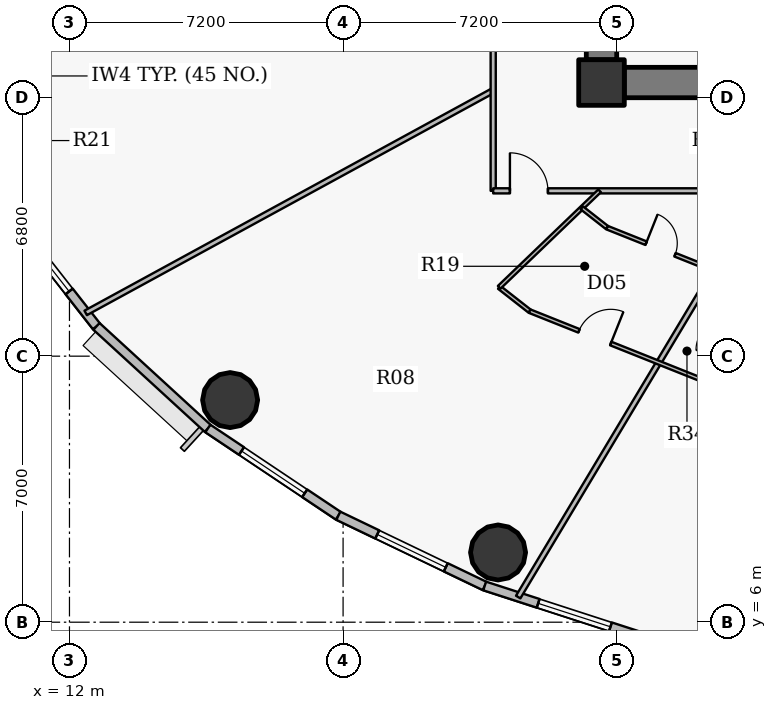
"""IFC4 building model, lengths in metres.
Left out: names, types, materials, properties, quantities, classifications, styles, units other than length and angle.
Written with IfcOpenShell. Run it as: python <this file> out.ifc"""

import sys

from ifc_helpers import new_model, si_unit, direction, frame, frame_2d, origin, origin_2d, place, context, subcontext, project, spatial, rectangle, hollow_circle, extrude, source, transform, mapped, element, fill, save


model = new_model("IFC4")
c1 = context("Model", 3, precision=1e-05, world=origin(), true_north=direction((0.0, 1.0)))
c2 = subcontext(c1, "Body", "Model", "MODEL_VIEW")
j1 = project(units=[si_unit("LENGTHUNIT", "METRE"), si_unit("PLANEANGLEUNIT", "RADIAN")], contexts=[c1])
p1 = place(None, origin())
s1 = spatial("IfcSite", under=j1, at=p1, CompositionType="ELEMENT")
p2 = place(p1, origin())
s2 = spatial("IfcBuilding", under=s1, at=p2, CompositionType="ELEMENT")
p3 = place(p2, frame((0.0, 0.0, 104.7)))
s3 = spatial("IfcBuildingStorey", under=s2, at=p3, CompositionType="ELEMENT", Elevation=104.7)
p4 = place(p3, frame((26.0, 20.2, 0.0), z_axis=(0.0, 0.0, 1.0), x_axis=(1.0, 0.0, 0.0)))
e1 = element("IfcColumn", 1, at=p4, inside=s3, PredefinedType="COLUMN", context=c2, shape_type="SweptSolid", body=[
    extrude(rectangle(XDim=1.2, YDim=1.2, at=origin_2d()), origin(), (0.0, 0.0, 1.0), 3.75),
])
p5 = place(p3, frame((45.4, 20.2, 0.0), z_axis=(0.0, 0.0, 1.0), x_axis=(-1.0, 0.0, 0.0)))
e2 = element("IfcWall", 2, at=p5, inside=s3, PredefinedType="SHEAR", context=c2, shape_type="SweptSolid", body=[
    extrude(rectangle(XDim=18.8, YDim=0.8, at=frame_2d((9.4, 0.0))), origin(), (0.0, 0.0, 1.0), 2.95),
])
p6 = place(p5, frame((10.15, 0.0, 0.0)))
e3 = element("IfcOpeningElement", 3, at=p6, cuts=e2, PredefinedType="OPENING", context=c2, shape_type="SweptSolid", body=[
    extrude(rectangle(XDim=1.15, YDim=2.15, at=origin_2d()), frame((0.575, 0.41, 1.075), z_axis=(0.0, -1.0, 0.0), x_axis=(1.0, 0.0, 0.0)), (0.0, 0.0, 1.0), 0.82),
])
p7 = place(p3, frame((26.0, 20.8, 0.0), z_axis=(0.0, 0.0, 1.0), x_axis=(0.0, 1.0, 0.0)))
e4 = element("IfcWall", 4, at=p7, inside=s3, PredefinedType="SHEAR", context=c2, shape_type="SweptSolid", body=[
    extrude(rectangle(XDim=12.4, YDim=0.8, at=frame_2d((6.2, 0.0))), origin(), (0.0, 0.0, 1.0), 2.95),
])
p8 = place(p7, frame((5.79, 0.0, 0.0)))
e5 = element("IfcOpeningElement", 5, at=p8, cuts=e4, PredefinedType="OPENING", context=c2, shape_type="SweptSolid", body=[
    extrude(rectangle(XDim=0.82, YDim=2.1, at=origin_2d()), frame((0.41, 0.41, 1.05), z_axis=(0.0, -1.0, 0.0), x_axis=(1.0, 0.0, 0.0)), (0.0, 0.0, 1.0), 0.82),
])
for number, where, z_axis, x_axis in (
    (6, (16.227, 11.844, 0.0), (0.0, 0.0, 1.0), (1.0, 0.0, 0.0)),
    (7, (23.278, 7.835, 0.0), (0.0, 0.0, 1.0), (1.0, 0.0, 0.0)),
):
    element("IfcColumn", number, at=place(p3, frame(where, z_axis=z_axis, x_axis=x_axis)), inside=s3, PredefinedType="COLUMN", context=c2, shape_type="SweptSolid", body=[
        extrude(hollow_circle(Radius=0.725, WallThickness=0.042, at=origin_2d()), origin(), (0.0, 0.0, 1.0), 3.75),
    ])
p9 = place(p3, frame((12.711, 13.783, 0.0), z_axis=(0.0, 0.0, 1.0), x_axis=(-0.616272103517, 0.787533297345, 0.0)))
e8 = element("IfcWall", 8, at=p9, inside=s3, PredefinedType="SOLIDWALL", context=c2, shape_type="SweptSolid", body=[
    extrude(rectangle(XDim=3.823, YDim=0.24, at=frame_2d((1.912, 0.0))), origin(), (0.0, 0.0, 1.0), 3.5),
])
p10 = place(p9, frame((1.168, 0.0, 0.9)))
e9 = element("IfcOpeningElement", 9, at=p10, cuts=e8, PredefinedType="OPENING", context=c2, shape_type="SweptSolid", body=[
    extrude(rectangle(XDim=1.25, YDim=1.65, at=origin_2d()), frame((0.625, 0.13, 0.825), z_axis=(0.0, -1.0, 0.0), x_axis=(1.0, 0.0, 0.0)), (0.0, 0.0, 1.0), 0.26),
])
p11 = place(p3, frame((15.642, 11.097, 0.0), z_axis=(0.0, 0.0, 1.0), x_axis=(-0.737113356241, 0.675769117414, 0.0)))
e10 = element("IfcWall", 10, at=p11, inside=s3, PredefinedType="SOLIDWALL", context=c2, shape_type="SweptSolid", body=[
    extrude(rectangle(XDim=3.976, YDim=0.24, at=frame_2d((1.988, 0.0))), origin(), (0.0, 0.0, 1.0), 3.5),
])
p12 = place(p3, frame((19.075, 8.801, 0.0), z_axis=(0.0, 0.0, 1.0), x_axis=(-0.831221811447, 0.555940914284, 0.0)))
e11 = element("IfcWall", 11, at=p12, inside=s3, PredefinedType="SOLIDWALL", context=c2, shape_type="SweptSolid", body=[
    extrude(rectangle(XDim=4.13, YDim=0.24, at=frame_2d((2.065, 0.0))), origin(), (0.0, 0.0, 1.0), 3.5),
])
p13 = place(p12, frame((1.065, 0.0, 0.9)))
e12 = element("IfcOpeningElement", 12, at=p13, cuts=e11, PredefinedType="OPENING", context=c2, shape_type="SweptSolid", body=[
    extrude(rectangle(XDim=2.0, YDim=1.75, at=origin_2d()), frame((1.0, 0.13, 0.875), z_axis=(0.0, -1.0, 0.0), x_axis=(1.0, 0.0, 0.0)), (0.0, 0.0, 1.0), 0.26),
])
p14 = place(p3, frame((22.926, 6.953, 0.0), z_axis=(0.0, 0.0, 1.0), x_axis=(-0.901589935876, 0.432591709962, 0.0)))
e13 = element("IfcWall", 13, at=p14, inside=s3, PredefinedType="SOLIDWALL", context=c2, shape_type="SweptSolid", body=[
    extrude(rectangle(XDim=4.272, YDim=0.24, at=frame_2d((2.136, 0.0))), origin(), (0.0, 0.0, 1.0), 3.5),
])
p15 = place(p14, frame((1.136, 0.0, 0.9)))
e14 = element("IfcOpeningElement", 14, at=p15, cuts=e13, PredefinedType="OPENING", context=c2, shape_type="SweptSolid", body=[
    extrude(rectangle(XDim=2.0, YDim=1.75, at=origin_2d()), frame((1.0, 0.13, 0.875), z_axis=(0.0, -1.0, 0.0), x_axis=(1.0, 0.0, 0.0)), (0.0, 0.0, 1.0), 0.26),
])
p16 = place(p3, frame((27.1, 5.599, 0.0), z_axis=(0.0, 0.0, 1.0), x_axis=(-0.951211346073, 0.308540070495, 0.0)))
e15 = element("IfcWall", 15, at=p16, inside=s3, PredefinedType="SOLIDWALL", context=c2, shape_type="SweptSolid", body=[
    extrude(rectangle(XDim=4.388, YDim=0.24, at=frame_2d((2.194, 0.0))), origin(), (0.0, 0.0, 1.0), 3.5),
])
p17 = place(p16, frame((0.909, 0.0, 0.9)))
e16 = element("IfcOpeningElement", 16, at=p17, cuts=e15, PredefinedType="OPENING", context=c2, shape_type="SweptSolid", body=[
    extrude(rectangle(XDim=2.0, YDim=1.75, at=origin_2d()), frame((1.0, 0.13, 0.875), z_axis=(0.0, -1.0, 0.0), x_axis=(1.0, 0.0, 0.0)), (0.0, 0.0, 1.0), 0.26),
])
p18 = place(p3, frame((12.427, 14.138, 0.0), z_axis=(0.0, 0.0, 1.0), x_axis=(0.877835987922, 0.47896135367, 0.0)))
e17 = element("IfcWall", 17, at=p18, inside=s3, PredefinedType="PARTITIONING", context=c2, shape_type="SweptSolid", body=[
    extrude(rectangle(XDim=12.215, YDim=0.135, at=frame_2d((6.107, 0.0))), origin(), (0.0, 0.0, 1.0), 2.935),
])
p19 = place(p3, frame((23.15, 17.35, 0.0), z_axis=(0.0, 0.0, 1.0), x_axis=(0.0, 1.0, 0.0)))
e18 = element("IfcWall", 18, at=p19, inside=s3, PredefinedType="PARTITIONING", context=c2, shape_type="SweptSolid", body=[
    extrude(rectangle(XDim=19.3, YDim=0.135, at=frame_2d((9.65, 0.0))), origin(), (0.0, 0.0, 1.0), 2.935),
])
p20 = place(p19, frame((7.86, 0.0, 0.0)))
e19 = element("IfcOpeningElement", 19, at=p20, cuts=e18, PredefinedType="OPENING", context=c2, shape_type="SweptSolid", body=[
    extrude(rectangle(XDim=1.0, YDim=2.15, at=origin_2d()), frame((0.5, 0.078, 1.075), z_axis=(0.0, -1.0, 0.0), x_axis=(1.0, 0.0, 0.0)), (0.0, 0.0, 1.0), 0.155),
])
p21 = place(p3, frame((23.15, 17.35, 0.0), z_axis=(0.0, 0.0, 1.0), x_axis=(1.0, 0.0, 0.0)))
e20 = element("IfcWall", 20, at=p21, inside=s3, PredefinedType="PARTITIONING", context=c2, shape_type="SweptSolid", body=[
    extrude(rectangle(XDim=10.373, YDim=0.135, at=frame_2d((5.187, 0.0))), origin(), (0.0, 0.0, 1.0), 2.935),
])
p22 = place(p21, frame((0.44, 0.0, 0.0)))
e21 = element("IfcOpeningElement", 21, at=p22, cuts=e20, PredefinedType="OPENING", context=c2, shape_type="SweptSolid", body=[
    extrude(rectangle(XDim=1.0, YDim=2.15, at=origin_2d()), frame((0.5, 0.078, 1.075), z_axis=(0.0, -1.0, 0.0), x_axis=(1.0, 0.0, 0.0)), (0.0, 0.0, 1.0), 0.155),
])
p23 = place(p3, frame((23.307, 14.812, 0.0), z_axis=(0.0, 0.0, 1.0), x_axis=(0.787398737985, -0.616444018075, 0.0)))
e22 = element("IfcWall", 22, at=p23, inside=s3, PredefinedType="PARTITIONING", context=c2, shape_type="SweptSolid", body=[
    extrude(rectangle(XDim=1.018, YDim=0.1, at=frame_2d((0.509, 0.0))), origin(), (0.0, 0.0, 1.0), 3.085),
])
p24 = place(p3, frame((23.307, 14.812, 0.0), z_axis=(0.0, 0.0, 1.0), x_axis=(0.721286127108, 0.692637223113, 0.0)))
e23 = element("IfcWall", 23, at=p24, inside=s3, PredefinedType="PARTITIONING", context=c2, shape_type="SweptSolid", body=[
    extrude(rectangle(XDim=3.664, YDim=0.1, at=frame_2d((1.832, 0.0))), origin(), (0.0, 0.0, 1.0), 3.5),
])
p25 = place(p3, frame((23.808, 6.661, 0.0), z_axis=(0.0, 0.0, 1.0), x_axis=(0.51416439954, 0.857691652195, 0.0)))
e24 = element("IfcWall", 24, at=p25, inside=s3, PredefinedType="PARTITIONING", context=c2, shape_type="SweptSolid", body=[
    extrude(rectangle(XDim=12.462, YDim=0.135, at=frame_2d((6.231, 0.0))), origin(), (0.0, 0.0, 1.0), 2.935),
])
p26 = place(p3, frame((24.109, 14.184, 0.0), z_axis=(0.0, 0.0, 1.0), x_axis=(0.9288090756, -0.370558633798, 0.0)))
e25 = element("IfcWall", 25, at=p26, inside=s3, PredefinedType="PARTITIONING", context=c2, shape_type="SweptSolid", body=[
    extrude(rectangle(XDim=6.072, YDim=0.1, at=frame_2d((3.036, 0.0))), origin(), (0.0, 0.0, 1.0), 2.935),
])
p27 = place(p26, frame((1.398, 0.0, 0.0)))
e26 = element("IfcOpeningElement", 26, at=p27, cuts=e25, PredefinedType="OPENING", context=c2, shape_type="SweptSolid", body=[
    extrude(rectangle(XDim=0.9, YDim=2.1, at=origin_2d()), frame((0.45, 0.06, 1.05), z_axis=(0.0, -1.0, 0.0), x_axis=(1.0, 0.0, 0.0)), (0.0, 0.0, 1.0), 0.12),
])
p28 = place(p3, frame((25.483, 16.901, 0.0), z_axis=(0.0, 0.0, 1.0), x_axis=(0.787321722918, -0.616542378609, 0.0)))
e27 = element("IfcWall", 27, at=p28, inside=s3, PredefinedType="PARTITIONING", context=c2, shape_type="SweptSolid", body=[
    extrude(rectangle(XDim=0.844, YDim=0.1, at=frame_2d((0.422, 0.0))), origin(), (0.0, 0.0, 1.0), 3.5),
])
p29 = place(p3, frame((26.147, 16.381, 0.0), z_axis=(0.0, 0.0, 1.0), x_axis=(0.928793125476, -0.370598610451, 0.0)))
e28 = element("IfcWall", 28, at=p29, inside=s3, PredefinedType="PARTITIONING", context=c2, shape_type="SweptSolid", body=[
    extrude(rectangle(XDim=3.03, YDim=0.1, at=frame_2d((1.515, 0.0))), origin(), (0.0, 0.0, 1.0), 2.935),
])
p30 = place(p29, frame((1.105, 0.0, 0.0)))
e29 = element("IfcOpeningElement", 29, at=p30, cuts=e28, PredefinedType="OPENING", context=c2, shape_type="SweptSolid", body=[
    extrude(rectangle(XDim=0.82, YDim=2.1, at=origin_2d()), frame((0.41, 0.06, 1.05), z_axis=(0.0, -1.0, 0.0), x_axis=(1.0, 0.0, 0.0)), (0.0, 0.0, 1.0), 0.12),
])
p31 = place(p3, frame((25.6, 20.79, 0.0), z_axis=(0.0, 0.0, 1.0), x_axis=(0.0, -1.0, 0.0)))
e30 = element("IfcWall", 30, at=p31, inside=s3, PredefinedType="PARTITIONING", context=c2, shape_type="SweptSolid", body=[
    extrude(rectangle(XDim=0.99, YDim=0.135, at=frame_2d((0.495, 0.0))), origin(), (0.0, 0.0, 1.0), 3.5),
])
p32 = place(p3, frame((25.907, 19.8, 0.0), z_axis=(0.0, 0.0, 1.0), x_axis=(1.0, 0.0, 0.0)))
e31 = element("IfcWall", 31, at=p32, inside=s3, PredefinedType="PARTITIONING", context=c2, shape_type="SweptSolid", body=[
    extrude(rectangle(XDim=0.683, YDim=0.135, at=frame_2d((0.341, 0.0))), origin(), (0.0, 0.0, 1.0), 2.935),
])
m1 = source(origin(), c2, "Body", "SweptSolid", [
    extrude(rectangle(XDim=1.25, YDim=1.65, at=origin_2d()), frame((0.625, 0.03, 0.825), z_axis=(0.0, -1.0, 0.0), x_axis=(1.0, 0.0, 0.0)), (0.0, 0.0, 1.0), 0.06),
])
p33 = place(p10, origin())
e32 = element("IfcWindow", 32, at=p33, inside=s3, PartitioningType="SINGLE_PANEL", PredefinedType="WINDOW", context=c2, shape_type="MappedRepresentation", body=[
    mapped(m1, transform((0.0, 0.0, 0.0), x_axis=(1.0, 0.0, 0.0), y_axis=(0.0, 1.0, 0.0), z_axis=(0.0, 0.0, 1.0), scale=1.0)),
])
fill(e9, e32)
m2 = source(origin(), c2, "Body", "SweptSolid", [
    extrude(rectangle(XDim=2.0, YDim=1.75, at=origin_2d()), frame((1.0, 0.03, 0.875), z_axis=(0.0, -1.0, 0.0), x_axis=(1.0, 0.0, 0.0)), (0.0, 0.0, 1.0), 0.06),
])
p34 = place(p13, origin())
e33 = element("IfcWindow", 33, at=p34, inside=s3, PartitioningType="DOUBLE_PANEL_VERTICAL", PredefinedType="WINDOW", context=c2, shape_type="MappedRepresentation", body=[
    mapped(m2, transform((0.0, 0.0, 0.0), x_axis=(1.0, 0.0, 0.0), y_axis=(0.0, 1.0, 0.0), z_axis=(0.0, 0.0, 1.0), scale=1.0)),
])
fill(e12, e33)
p35 = place(p15, origin())
e34 = element("IfcWindow", 34, at=p35, inside=s3, PartitioningType="DOUBLE_PANEL_VERTICAL", PredefinedType="WINDOW", context=c2, shape_type="MappedRepresentation", body=[
    mapped(m2, transform((0.0, 0.0, 0.0), x_axis=(1.0, 0.0, 0.0), y_axis=(0.0, 1.0, 0.0), z_axis=(0.0, 0.0, 1.0), scale=1.0)),
])
fill(e14, e34)
p36 = place(p17, origin())
e35 = element("IfcWindow", 35, at=p36, inside=s3, PartitioningType="DOUBLE_PANEL_VERTICAL", PredefinedType="WINDOW", context=c2, shape_type="MappedRepresentation", body=[
    mapped(m2, transform((0.0, 0.0, 0.0), x_axis=(1.0, 0.0, 0.0), y_axis=(0.0, 1.0, 0.0), z_axis=(0.0, 0.0, 1.0), scale=1.0)),
])
fill(e16, e35)
m3 = source(origin(), c2, "Body", "SweptSolid", [
    extrude(rectangle(XDim=1.0, YDim=2.15, at=origin_2d()), frame((0.5, 0.025, 1.075), z_axis=(0.0, -1.0, 0.0), x_axis=(1.0, 0.0, 0.0)), (0.0, 0.0, 1.0), 0.05),
])
p37 = place(p22, origin())
e36 = element("IfcDoor", 36, at=p37, inside=s3, OperationType="SINGLE_SWING_LEFT", PredefinedType="DOOR", context=c2, shape_type="MappedRepresentation", body=[
    mapped(m3, transform((0.0, 0.0, 0.0), x_axis=(1.0, 0.0, 0.0), y_axis=(0.0, 1.0, 0.0), z_axis=(0.0, 0.0, 1.0), scale=1.0)),
])
fill(e21, e36)
m4 = source(origin(), c2, "Body", "SweptSolid", [
    extrude(rectangle(XDim=0.9, YDim=2.1, at=origin_2d()), frame((0.45, 0.025, 1.05), z_axis=(0.0, -1.0, 0.0), x_axis=(1.0, 0.0, 0.0)), (0.0, 0.0, 1.0), 0.05),
])
p38 = place(p27, origin())
e37 = element("IfcDoor", 37, at=p38, inside=s3, OperationType="SINGLE_SWING_RIGHT", PredefinedType="DOOR", context=c2, shape_type="MappedRepresentation", body=[
    mapped(m4, transform((0.0, 0.0, 0.0), x_axis=(1.0, 0.0, 0.0), y_axis=(0.0, 1.0, 0.0), z_axis=(0.0, 0.0, 1.0), scale=1.0)),
])
fill(e26, e37)
m5 = source(origin(), c2, "Body", "SweptSolid", [
    extrude(rectangle(XDim=0.82, YDim=2.1, at=origin_2d()), frame((0.41, 0.025, 1.05), z_axis=(0.0, -1.0, 0.0), x_axis=(1.0, 0.0, 0.0)), (0.0, 0.0, 1.0), 0.05),
])
p39 = place(p30, origin())
e38 = element("IfcDoor", 38, at=p39, inside=s3, OperationType="SINGLE_SWING_LEFT", PredefinedType="DOOR", context=c2, shape_type="MappedRepresentation", body=[
    mapped(m5, transform((0.0, 0.0, 0.0), x_axis=(1.0, 0.0, 0.0), y_axis=(0.0, 1.0, 0.0), z_axis=(0.0, 0.0, 1.0), scale=1.0)),
])
fill(e29, e38)
save(model, sys.argv[1])
